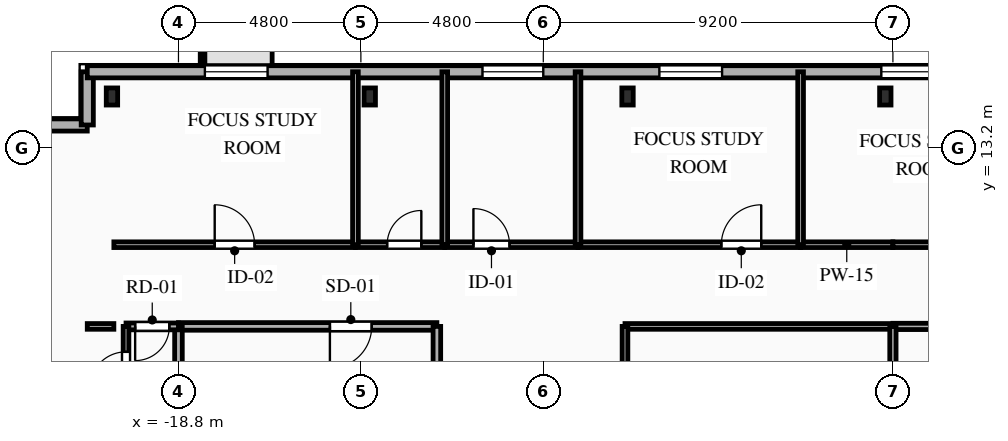
"""IFC4 building model, lengths in metres.
Left out: names, types, materials, properties, quantities, classifications, styles, units other than length and angle.
Written with IfcOpenShell. Run it as: python <this file> out.ifc"""

import sys

from ifc_helpers import new_model, si_unit, direction, frame, frame_2d, origin, origin_2d, place, context, subcontext, project, spatial, rectangle, i_section, extrude, element, fill, save


model = new_model("IFC4")
c1 = context("Model", 3, precision=1e-05, world=origin(), true_north=direction((0.0, 1.0)))
c2 = subcontext(c1, "Body", "Model", "MODEL_VIEW")
j1 = project(units=[si_unit("LENGTHUNIT", "METRE"), si_unit("PLANEANGLEUNIT", "RADIAN")], contexts=[c1])
p1 = place(None, origin())
s1 = spatial("IfcSite", under=j1, at=p1, CompositionType="ELEMENT")
p2 = place(p1, origin())
s2 = spatial("IfcBuilding", under=s1, at=p2, CompositionType="ELEMENT")
p3 = place(p2, frame((0.0, 0.0, 245.05)))
s3 = spatial("IfcBuildingStorey", under=s2, at=p3, CompositionType="ELEMENT", Elevation=245.05)
for number, where, z_axis, x_axis in (
    (1, (-0.2, 14.55, 0.0), (0.0, 0.0, 1.0), (1.0, 0.0, 0.0)),
    (2, (-6.983, 14.55, 0.0), (0.0, 0.0, 1.0), (1.0, 0.0, 0.0)),
    (3, (-13.767, 14.55, 0.0), (0.0, 0.0, 1.0), (1.0, 0.0, 0.0)),
    (4, (-20.55, 14.55, 0.0), (0.0, 0.0, 1.0), (1.0, 0.0, 0.0)),
):
    element("IfcColumn", number, at=place(p3, frame(where, z_axis=z_axis, x_axis=x_axis)), inside=s3, PredefinedType="COLUMN", context=c2, shape_type="SweptSolid", body=[
        extrude(i_section(OverallWidth=0.3, OverallDepth=0.45, WebThickness=0.014, FlangeThickness=0.026, FilletRadius=0.027, at=origin_2d()), origin(), (0.0, 0.0, 1.0), 3.35),
    ])
p4 = place(p3, frame((-22.6, 13.8, 0.0), z_axis=(0.0, 0.0, 1.0), x_axis=(1.0, 0.0, 0.0)))
e5 = element("IfcWall", 5, at=p4, inside=s3, PredefinedType="SOLIDWALL", context=c2, shape_type="SweptSolid", body=[
    extrude(rectangle(XDim=1.4, YDim=0.32, at=frame_2d((0.7, 0.0))), origin(), (0.0, 0.0, 1.0), 3.04),
])
p5 = place(p3, frame((-21.2, 13.8, 0.0), z_axis=(0.0, 0.0, 1.0), x_axis=(0.0, 1.0, 0.0)))
e6 = element("IfcWall", 6, at=p5, inside=s3, PredefinedType="SOLIDWALL", context=c2, shape_type="SweptSolid", body=[
    extrude(rectangle(XDim=1.4, YDim=0.32, at=frame_2d((0.7, 0.0))), origin(), (0.0, 0.0, 1.0), 3.04),
])
p6 = place(p3, frame((-21.2, 15.2, 0.0), z_axis=(0.0, 0.0, 1.0), x_axis=(1.0, 0.0, 0.0)))
e7 = element("IfcWall", 7, at=p6, inside=s3, PredefinedType="SOLIDWALL", context=c2, shape_type="SweptSolid", body=[
    extrude(rectangle(XDim=42.0, YDim=0.32, at=frame_2d((21.0, 0.0))), origin(), (0.0, 0.0, 1.0), 3.04),
])
p7 = place(p6, frame((3.095, 0.0, 0.85)))
e8 = element("IfcOpeningElement", 8, at=p7, cuts=e7, PredefinedType="OPENING", context=c2, shape_type="SweptSolid", body=[
    extrude(rectangle(XDim=1.65, YDim=1.85, at=frame_2d((0.825, 0.925))), frame((0.0, 0.17, 0.0), z_axis=(0.0, -1.0, 0.0), x_axis=(1.0, 0.0, 0.0)), (0.0, 0.0, 1.0), 0.34),
])
p8 = place(p6, frame((10.4, 0.0, 0.85)))
e9 = element("IfcOpeningElement", 9, at=p8, cuts=e7, PredefinedType="OPENING", context=c2, shape_type="SweptSolid", body=[
    extrude(rectangle(XDim=1.6, YDim=1.85, at=frame_2d((0.8, 0.925))), frame((0.0, 0.17, 0.0), z_axis=(0.0, -1.0, 0.0), x_axis=(1.0, 0.0, 0.0)), (0.0, 0.0, 1.0), 0.34),
])
p9 = place(p6, frame((15.055, 0.0, 0.85)))
e10 = element("IfcOpeningElement", 10, at=p9, cuts=e7, PredefinedType="OPENING", context=c2, shape_type="SweptSolid", body=[
    extrude(rectangle(XDim=1.65, YDim=1.85, at=frame_2d((0.825, 0.925))), frame((0.0, 0.17, 0.0), z_axis=(0.0, -1.0, 0.0), x_axis=(1.0, 0.0, 0.0)), (0.0, 0.0, 1.0), 0.34),
])
p10 = place(p6, frame((20.895, 0.0, 0.85)))
e11 = element("IfcOpeningElement", 11, at=p10, cuts=e7, PredefinedType="OPENING", context=c2, shape_type="SweptSolid", body=[
    extrude(rectangle(XDim=1.65, YDim=1.85, at=frame_2d((0.825, 0.925))), frame((0.0, 0.17, 0.0), z_axis=(0.0, -1.0, 0.0), x_axis=(1.0, 0.0, 0.0)), (0.0, 0.0, 1.0), 0.34),
])
p11 = place(p6, frame((26.775, 0.0, 0.85)))
e12 = element("IfcOpeningElement", 12, at=p11, cuts=e7, PredefinedType="OPENING", context=c2, shape_type="SweptSolid", body=[
    extrude(rectangle(XDim=1.65, YDim=1.85, at=frame_2d((0.825, 0.925))), frame((0.0, 0.17, 0.0), z_axis=(0.0, -1.0, 0.0), x_axis=(1.0, 0.0, 0.0)), (0.0, 0.0, 1.0), 0.34),
])
p12 = place(p6, frame((32.655, 0.0, 0.85)))
e13 = element("IfcOpeningElement", 13, at=p12, cuts=e7, PredefinedType="OPENING", context=c2, shape_type="SweptSolid", body=[
    extrude(rectangle(XDim=1.65, YDim=1.85, at=frame_2d((0.825, 0.925))), frame((0.0, 0.17, 0.0), z_axis=(0.0, -1.0, 0.0), x_axis=(1.0, 0.0, 0.0)), (0.0, 0.0, 1.0), 0.34),
])
p13 = place(p6, frame((38.175, 0.0, 0.85)))
e14 = element("IfcOpeningElement", 14, at=p13, cuts=e7, PredefinedType="OPENING", context=c2, shape_type="SweptSolid", body=[
    extrude(rectangle(XDim=1.65, YDim=1.85, at=frame_2d((0.825, 0.925))), frame((0.0, 0.17, 0.0), z_axis=(0.0, -1.0, 0.0), x_axis=(1.0, 0.0, 0.0)), (0.0, 0.0, 1.0), 0.34),
])
p14 = place(p3, frame((-12.0, 8.5, 0.0), z_axis=(0.0, 0.0, 1.0), x_axis=(-1.0, 0.0, 0.0)))
e15 = element("IfcWall", 15, at=p14, inside=s3, PredefinedType="PARTITIONING", context=c2, shape_type="SweptSolid", body=[
    extrude(rectangle(XDim=6.8, YDim=0.2, at=frame_2d((3.4, 0.0))), origin(), (0.0, 0.0, 1.0), 3.04),
])
p15 = place(p14, frame((1.715, 0.0, 0.0)))
e16 = element("IfcOpeningElement", 16, at=p15, cuts=e15, PredefinedType="OPENING", context=c2, shape_type="SweptSolid", body=[
    extrude(rectangle(XDim=1.1, YDim=2.15, at=frame_2d((0.55, 1.075))), frame((0.0, 0.11, 0.0), z_axis=(0.0, -1.0, 0.0), x_axis=(1.0, 0.0, 0.0)), (0.0, 0.0, 1.0), 0.22),
])
p16 = place(p3, frame((-12.0, 5.6, 0.0), z_axis=(0.0, 0.0, 1.0), x_axis=(0.0, 1.0, 0.0)))
e17 = element("IfcWall", 17, at=p16, inside=s3, PredefinedType="PARTITIONING", context=c2, shape_type="SweptSolid", body=[
    extrude(rectangle(XDim=2.9, YDim=0.2, at=frame_2d((1.45, 0.0))), origin(), (0.0, 0.0, 1.0), 3.04),
])
p17 = place(p3, frame((-18.8, 8.5, 0.0), z_axis=(0.0, 0.0, 1.0), x_axis=(0.0, -1.0, 0.0)))
e18 = element("IfcWall", 18, at=p17, inside=s3, PredefinedType="PARTITIONING", context=c2, shape_type="SweptSolid", body=[
    extrude(rectangle(XDim=2.9, YDim=0.2, at=frame_2d((1.45, 0.0))), origin(), (0.0, 0.0, 1.0), 2.665),
])
p18 = place(p3, frame((-18.8, 8.5, 0.0), z_axis=(0.0, 0.0, 1.0), x_axis=(-1.0, 0.0, 0.0)))
e19 = element("IfcWall", 19, at=p18, inside=s3, PredefinedType="PARTITIONING", context=c2, shape_type="SweptSolid", body=[
    extrude(rectangle(XDim=1.38, YDim=0.18, at=frame_2d((0.69, 0.0))), origin(), (0.0, 0.0, 1.0), 3.04),
])
p19 = place(p18, frame((0.24, 0.0, 0.0)))
e20 = element("IfcOpeningElement", 20, at=p19, cuts=e19, PredefinedType="OPENING", context=c2, shape_type="SweptSolid", body=[
    extrude(rectangle(XDim=0.9, YDim=2.1, at=frame_2d((0.45, 1.05))), frame((0.0, 0.1, 0.0), z_axis=(0.0, -1.0, 0.0), x_axis=(1.0, 0.0, 0.0)), (0.0, 0.0, 1.0), 0.2),
])
p20 = place(p3, frame((-20.5, 8.5, 0.0), z_axis=(0.0, 0.0, 1.0), x_axis=(-1.0, 0.0, 0.0)))
e21 = element("IfcWall", 21, at=p20, inside=s3, PredefinedType="PARTITIONING", context=c2, shape_type="SweptSolid", body=[
    extrude(rectangle(XDim=0.7, YDim=0.15, at=frame_2d((0.35, 0.0))), origin(), (0.0, 0.0, 1.0), 3.04),
])
p21 = place(p3, frame((-20.5, 10.65, 0.0), z_axis=(0.0, 0.0, 1.0), x_axis=(1.0, 0.0, 0.0)))
e22 = element("IfcWall", 22, at=p21, inside=s3, PredefinedType="PARTITIONING", context=c2, shape_type="SweptSolid", body=[
    extrude(rectangle(XDim=6.357, YDim=0.15, at=frame_2d((3.178, 0.0))), origin(), (0.0, 0.0, 1.0), 3.04),
])
p22 = place(p21, frame((2.654, 0.0, 0.0)))
e23 = element("IfcOpeningElement", 23, at=p22, cuts=e22, PredefinedType="OPENING", context=c2, shape_type="SweptSolid", body=[
    extrude(rectangle(XDim=1.05, YDim=2.15, at=frame_2d((0.525, 1.075))), frame((0.0, 0.085, 0.0), z_axis=(0.0, -1.0, 0.0), x_axis=(1.0, 0.0, 0.0)), (0.0, 0.0, 1.0), 0.17),
])
p23 = place(p3, frame((-14.143, 10.65, 0.0), z_axis=(0.0, 0.0, 1.0), x_axis=(1.0, 0.0, 0.0)))
e24 = element("IfcWall", 24, at=p23, inside=s3, PredefinedType="PLUMBINGWALL", context=c2, shape_type="SweptSolid", body=[
    extrude(rectangle(XDim=2.35, YDim=0.15, at=frame_2d((1.175, 0.0))), origin(), (0.0, 0.0, 1.0), 3.04),
])
p24 = place(p23, frame((0.834, 0.0, 0.0)))
e25 = element("IfcOpeningElement", 25, at=p24, cuts=e24, PredefinedType="OPENING", context=c2, shape_type="SweptSolid", body=[
    extrude(rectangle(XDim=0.9, YDim=2.1, at=frame_2d((0.45, 1.05))), frame((0.0, 0.085, 0.0), z_axis=(0.0, -1.0, 0.0), x_axis=(1.0, 0.0, 0.0)), (0.0, 0.0, 1.0), 0.17),
])
p25 = place(p3, frame((-11.793, 10.65, 0.0), z_axis=(0.0, 0.0, 1.0), x_axis=(1.0, 0.0, 0.0)))
e26 = element("IfcWall", 26, at=p25, inside=s3, PredefinedType="PARTITIONING", context=c2, shape_type="SweptSolid", body=[
    extrude(rectangle(XDim=3.507, YDim=0.15, at=frame_2d((1.753, 0.0))), origin(), (0.0, 0.0, 1.0), 3.04),
])
p26 = place(p25, frame((0.755, 0.0, 0.0)))
e27 = element("IfcOpeningElement", 27, at=p26, cuts=e26, PredefinedType="OPENING", context=c2, shape_type="SweptSolid", body=[
    extrude(rectangle(XDim=0.95, YDim=2.1, at=frame_2d((0.475, 1.05))), frame((0.0, 0.085, 0.0), z_axis=(0.0, -1.0, 0.0), x_axis=(1.0, 0.0, 0.0)), (0.0, 0.0, 1.0), 0.17),
])
p27 = place(p3, frame((-8.286, 10.65, 0.0), z_axis=(0.0, 0.0, 1.0), x_axis=(1.0, 0.0, 0.0)))
e28 = element("IfcWall", 28, at=p27, inside=s3, PredefinedType="PARTITIONING", context=c2, shape_type="SweptSolid", body=[
    extrude(rectangle(XDim=5.857, YDim=0.15, at=frame_2d((2.928, 0.0))), origin(), (0.0, 0.0, 1.0), 3.04),
])
p28 = place(p27, frame((3.771, 0.0, 0.0)))
e29 = element("IfcOpeningElement", 29, at=p28, cuts=e28, PredefinedType="OPENING", context=c2, shape_type="SweptSolid", body=[
    extrude(rectangle(XDim=1.05, YDim=2.15, at=frame_2d((0.525, 1.075))), frame((0.0, 0.085, 0.0), z_axis=(0.0, -1.0, 0.0), x_axis=(1.0, 0.0, 0.0)), (0.0, 0.0, 1.0), 0.17),
])
p29 = place(p3, frame((-2.429, 10.65, 0.0), z_axis=(0.0, 0.0, 1.0), x_axis=(1.0, 0.0, 0.0)))
e30 = element("IfcWall", 30, at=p29, inside=s3, PredefinedType="PARTITIONING", context=c2, shape_type="SweptSolid", body=[
    extrude(rectangle(XDim=2.429, YDim=0.15, at=frame_2d((1.214, 0.0))), origin(), (0.0, 0.0, 1.0), 3.04),
])
p30 = place(p3, frame((0.0, 8.5, 0.0), z_axis=(0.0, 0.0, 1.0), x_axis=(-1.0, 0.0, 0.0)))
e31 = element("IfcWall", 31, at=p30, inside=s3, PredefinedType="PARTITIONING", context=c2, shape_type="SweptSolid", body=[
    extrude(rectangle(XDim=7.05, YDim=0.15, at=frame_2d((3.525, 0.0))), origin(), (0.0, 0.0, 1.0), 3.04),
])
p31 = place(p3, frame((0.0, 10.65, 0.0), z_axis=(0.0, 0.0, 1.0), x_axis=(1.0, 0.0, 0.0)))
e32 = element("IfcWall", 32, at=p31, inside=s3, PredefinedType="PARTITIONING", context=c2, shape_type="SweptSolid", body=[
    extrude(rectangle(XDim=3.429, YDim=0.15, at=frame_2d((1.714, 0.0))), origin(), (0.0, 0.0, 1.0), 3.04),
])
p32 = place(p31, frame((1.646, 0.0, 0.0)))
e33 = element("IfcOpeningElement", 33, at=p32, cuts=e32, PredefinedType="OPENING", context=c2, shape_type="SweptSolid", body=[
    extrude(rectangle(XDim=1.05, YDim=2.15, at=frame_2d((0.525, 1.075))), frame((0.0, 0.085, 0.0), z_axis=(0.0, -1.0, 0.0), x_axis=(1.0, 0.0, 0.0)), (0.0, 0.0, 1.0), 0.17),
])
p33 = place(p3, frame((7.05, 8.5, 0.0), z_axis=(0.0, 0.0, 1.0), x_axis=(-1.0, 0.0, 0.0)))
e34 = element("IfcWall", 34, at=p33, inside=s3, PredefinedType="PARTITIONING", context=c2, shape_type="SweptSolid", body=[
    extrude(rectangle(XDim=7.05, YDim=0.165, at=frame_2d((3.525, 0.0))), origin(), (0.0, 0.0, 1.0), 3.04),
])
p34 = place(p33, frame((3.542, 0.0, 0.0)))
e35 = element("IfcOpeningElement", 35, at=p34, cuts=e34, PredefinedType="OPENING", context=c2, shape_type="SweptSolid", body=[
    extrude(rectangle(XDim=1.15, YDim=2.15, at=frame_2d((0.575, 1.075))), frame((0.0, 0.093, 0.0), z_axis=(0.0, -1.0, 0.0), x_axis=(1.0, 0.0, 0.0)), (0.0, 0.0, 1.0), 0.185),
])
p35 = place(p3, frame((-7.05, 8.5, 0.0), z_axis=(0.0, 0.0, 1.0), x_axis=(0.0, -1.0, 0.0)))
e36 = element("IfcWall", 36, at=p35, inside=s3, PredefinedType="PARTITIONING", context=c2, shape_type="SweptSolid", body=[
    extrude(rectangle(XDim=14.1, YDim=0.15, at=frame_2d((7.05, 0.0))), origin(), (0.0, 0.0, 1.0), 3.04),
])
p36 = place(p35, frame((8.011, 0.0, 0.0)))
e37 = element("IfcOpeningElement", 37, at=p36, cuts=e36, PredefinedType="OPENING", context=c2, shape_type="SweptSolid", body=[
    extrude(rectangle(XDim=1.05, YDim=2.15, at=frame_2d((0.525, 1.075))), frame((0.0, 0.085, 0.0), z_axis=(0.0, -1.0, 0.0), x_axis=(1.0, 0.0, 0.0)), (0.0, 0.0, 1.0), 0.17),
])
p37 = place(p3, frame((-20.18, 5.68, 0.0), z_axis=(0.0, 0.0, 1.0), x_axis=(0.0, 1.0, 0.0)))
e38 = element("IfcWall", 38, at=p37, inside=s3, PredefinedType="PARTITIONING", context=c2, shape_type="SweptSolid", body=[
    extrude(rectangle(XDim=2.82, YDim=0.15, at=frame_2d((1.41, 0.0))), origin(), (0.0, 0.0, 1.0), 3.04),
])
p38 = place(p37, frame((1.201, 0.0, 0.0)))
e39 = element("IfcOpeningElement", 39, at=p38, cuts=e38, PredefinedType="OPENING", context=c2, shape_type="SweptSolid", body=[
    extrude(rectangle(XDim=0.95, YDim=2.1, at=frame_2d((0.475, 1.05))), frame((0.0, 0.085, 0.0), z_axis=(0.0, -1.0, 0.0), x_axis=(1.0, 0.0, 0.0)), (0.0, 0.0, 1.0), 0.17),
])
for number, where, z_axis, x_axis in (
    (40, (-14.143, 15.2, 0.0), (0.0, 0.0, 1.0), (0.0, -1.0, 0.0)),
    (41, (-11.793, 15.2, 0.0), (0.0, 0.0, 1.0), (0.0, -1.0, 0.0)),
):
    element("IfcWall", number, at=place(p3, frame(where, z_axis=z_axis, x_axis=x_axis)), inside=s3, PredefinedType="PLUMBINGWALL", context=c2, shape_type="SweptSolid", body=[
        extrude(rectangle(XDim=4.55, YDim=0.15, at=frame_2d((2.275, 0.0))), origin(), (0.0, 0.0, 1.0), 3.04),
    ])
for number, where, z_axis, x_axis in (
    (42, (-8.286, 15.2, 0.0), (0.0, 0.0, 1.0), (0.0, -1.0, 0.0)),
    (43, (-2.429, 15.2, 0.0), (0.0, 0.0, 1.0), (0.0, -1.0, 0.0)),
):
    element("IfcWall", number, at=place(p3, frame(where, z_axis=z_axis, x_axis=x_axis)), inside=s3, PredefinedType="PARTITIONING", context=c2, shape_type="SweptSolid", body=[
        extrude(rectangle(XDim=4.55, YDim=0.15, at=frame_2d((2.275, 0.0))), origin(), (0.0, 0.0, 1.0), 3.04),
    ])
p39 = place(p3, frame((0.0, 8.5, 0.0), z_axis=(0.0, 0.0, 1.0), x_axis=(0.0, -1.0, 0.0)))
e44 = element("IfcWall", 44, at=p39, inside=s3, PredefinedType="PARTITIONING", context=c2, shape_type="SweptSolid", body=[
    extrude(rectangle(XDim=7.05, YDim=0.165, at=frame_2d((3.525, 0.0))), origin(), (0.0, 0.0, 1.0), 3.04),
])
p40 = place(p7, origin())
e45 = element("IfcWindow", 45, at=p40, inside=s3, PartitioningType="SINGLE_PANEL", PredefinedType="WINDOW", context=c2, shape_type="SweptSolid", body=[
    extrude(rectangle(XDim=1.65, YDim=1.85, at=frame_2d((0.825, 0.925))), frame((0.0, 0.03, 0.0), z_axis=(0.0, -1.0, 0.0), x_axis=(1.0, 0.0, 0.0)), (0.0, 0.0, 1.0), 0.06),
])
fill(e8, e45)
p41 = place(p8, origin())
e46 = element("IfcWindow", 46, at=p41, inside=s3, PartitioningType="SINGLE_PANEL", PredefinedType="WINDOW", context=c2, shape_type="SweptSolid", body=[
    extrude(rectangle(XDim=1.6, YDim=1.85, at=frame_2d((0.8, 0.925))), frame((0.0, 0.03, 0.0), z_axis=(0.0, -1.0, 0.0), x_axis=(1.0, 0.0, 0.0)), (0.0, 0.0, 1.0), 0.06),
])
fill(e9, e46)
p42 = place(p9, origin())
e47 = element("IfcWindow", 47, at=p42, inside=s3, PartitioningType="SINGLE_PANEL", PredefinedType="WINDOW", context=c2, shape_type="SweptSolid", body=[
    extrude(rectangle(XDim=1.65, YDim=1.85, at=frame_2d((0.825, 0.925))), frame((0.0, 0.03, 0.0), z_axis=(0.0, -1.0, 0.0), x_axis=(1.0, 0.0, 0.0)), (0.0, 0.0, 1.0), 0.06),
])
fill(e10, e47)
p43 = place(p10, origin())
e48 = element("IfcWindow", 48, at=p43, inside=s3, PartitioningType="SINGLE_PANEL", PredefinedType="WINDOW", context=c2, shape_type="SweptSolid", body=[
    extrude(rectangle(XDim=1.65, YDim=1.85, at=frame_2d((0.825, 0.925))), frame((0.0, 0.03, 0.0), z_axis=(0.0, -1.0, 0.0), x_axis=(1.0, 0.0, 0.0)), (0.0, 0.0, 1.0), 0.06),
])
fill(e11, e48)
p44 = place(p15, origin())
e49 = element("IfcDoor", 49, at=p44, inside=s3, OperationType="SINGLE_SWING_RIGHT", PredefinedType="DOOR", context=c2, shape_type="SweptSolid", body=[
    extrude(rectangle(XDim=1.1, YDim=2.15, at=frame_2d((0.55, 1.075))), frame((0.0, 0.025, 0.0), z_axis=(0.0, -1.0, 0.0), x_axis=(1.0, 0.0, 0.0)), (0.0, 0.0, 1.0), 0.05),
])
fill(e16, e49)
p45 = place(p19, origin())
e50 = element("IfcDoor", 50, at=p45, inside=s3, OperationType="SINGLE_SWING_RIGHT", PredefinedType="DOOR", context=c2, shape_type="SweptSolid", body=[
    extrude(rectangle(XDim=0.9, YDim=2.1, at=frame_2d((0.45, 1.05))), frame((0.0, 0.025, 0.0), z_axis=(0.0, -1.0, 0.0), x_axis=(1.0, 0.0, 0.0)), (0.0, 0.0, 1.0), 0.05),
])
fill(e20, e50)
p46 = place(p22, origin())
e51 = element("IfcDoor", 51, at=p46, inside=s3, OperationType="SINGLE_SWING_LEFT", PredefinedType="DOOR", context=c2, shape_type="SweptSolid", body=[
    extrude(rectangle(XDim=1.05, YDim=2.15, at=frame_2d((0.525, 1.075))), frame((0.0, 0.025, 0.0), z_axis=(0.0, -1.0, 0.0), x_axis=(1.0, 0.0, 0.0)), (0.0, 0.0, 1.0), 0.05),
])
fill(e23, e51)
p47 = place(p24, origin())
e52 = element("IfcDoor", 52, at=p47, inside=s3, OperationType="SINGLE_SWING_RIGHT", PredefinedType="DOOR", context=c2, shape_type="SweptSolid", body=[
    extrude(rectangle(XDim=0.9, YDim=2.1, at=frame_2d((0.45, 1.05))), frame((0.0, 0.025, 0.0), z_axis=(0.0, -1.0, 0.0), x_axis=(1.0, 0.0, 0.0)), (0.0, 0.0, 1.0), 0.05),
])
fill(e25, e52)
p48 = place(p26, origin())
e53 = element("IfcDoor", 53, at=p48, inside=s3, OperationType="SINGLE_SWING_LEFT", PredefinedType="DOOR", context=c2, shape_type="SweptSolid", body=[
    extrude(rectangle(XDim=0.95, YDim=2.1, at=frame_2d((0.475, 1.05))), frame((0.0, 0.025, 0.0), z_axis=(0.0, -1.0, 0.0), x_axis=(1.0, 0.0, 0.0)), (0.0, 0.0, 1.0), 0.05),
])
fill(e27, e53)
p49 = place(p28, origin())
e54 = element("IfcDoor", 54, at=p49, inside=s3, OperationType="SINGLE_SWING_RIGHT", PredefinedType="DOOR", context=c2, shape_type="SweptSolid", body=[
    extrude(rectangle(XDim=1.05, YDim=2.15, at=frame_2d((0.525, 1.075))), frame((0.0, 0.025, 0.0), z_axis=(0.0, -1.0, 0.0), x_axis=(1.0, 0.0, 0.0)), (0.0, 0.0, 1.0), 0.05),
])
fill(e29, e54)
p50 = place(p38, origin())
e55 = element("IfcDoor", 55, at=p50, inside=s3, OperationType="SINGLE_SWING_LEFT", PredefinedType="DOOR", context=c2, shape_type="SweptSolid", body=[
    extrude(rectangle(XDim=0.95, YDim=2.1, at=frame_2d((0.475, 1.05))), frame((0.0, 0.025, 0.0), z_axis=(0.0, -1.0, 0.0), x_axis=(1.0, 0.0, 0.0)), (0.0, 0.0, 1.0), 0.05),
])
fill(e39, e55)
save(model, sys.argv[1])
